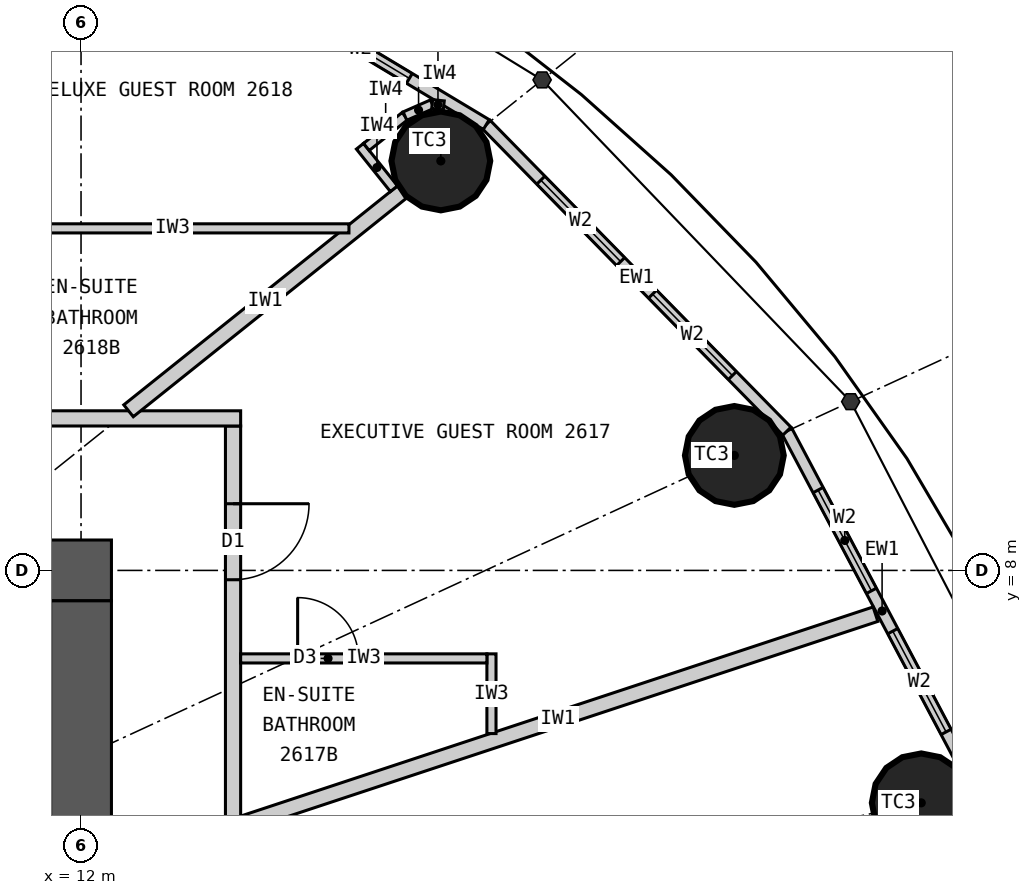
"""IFC4 building model, lengths in metres.
Left out: names, types, materials, properties, quantities, classifications, styles, units other than length and angle.
Written with IfcOpenShell. Run it as: python <this file> out.ifc"""

import sys

from ifc_helpers import new_model, si_unit, direction, frame, frame_2d, origin, origin_2d, place, context, subcontext, project, spatial, rectangle, circle, extrude, element, fill, save


model = new_model("IFC4")
c1 = context("Model", 3, precision=1e-05, world=origin(), true_north=direction((0.0, 1.0)))
c2 = subcontext(c1, "Body", "Model", "MODEL_VIEW")
j1 = project(units=[si_unit("LENGTHUNIT", "METRE"), si_unit("PLANEANGLEUNIT", "RADIAN")], contexts=[c1])
p1 = place(None, origin())
s1 = spatial("IfcSite", under=j1, at=p1, CompositionType="ELEMENT")
p2 = place(p1, origin())
s2 = spatial("IfcBuilding", under=s1, at=p2, CompositionType="ELEMENT")
p3 = place(p2, frame((0.0, 0.0, 105.6)))
s3 = spatial("IfcBuildingStorey", under=s2, at=p3, CompositionType="ELEMENT", Elevation=105.6)
for number, where, z_axis, x_axis in (
    (1, (23.055, 4.942, 0.0), (0.0, 0.0, 1.0), (1.0, 0.0, 0.0)),
    (2, (20.596, 9.513, 0.0), (0.0, 0.0, 1.0), (1.0, 0.0, 0.0)),
    (3, (16.734, 13.387, 0.0), (0.0, 0.0, 1.0), (1.0, 0.0, 0.0)),
):
    element("IfcColumn", number, at=place(p3, frame(where, z_axis=z_axis, x_axis=x_axis)), inside=s3, PredefinedType="COLUMN", context=c2, shape_type="SweptSolid", body=[
        extrude(circle(Radius=0.65, at=origin_2d()), origin(), (0.0, 0.0, 1.0), 3.3),
    ])
p4 = place(p3, frame((-12.4, 8.0, 0.0), z_axis=(0.0, 0.0, 1.0), x_axis=(1.0, 0.0, 0.0)))
e4 = element("IfcWall", 4, at=p4, inside=s3, PredefinedType="SHEAR", context=c2, shape_type="SweptSolid", body=[
    extrude(rectangle(XDim=24.8, YDim=0.8, at=frame_2d((12.4, 0.0))), origin(), (0.0, 0.0, 1.0), 3.3),
])
p5 = place(p4, frame((11.1, 0.0, 0.0)))
e5 = element("IfcOpeningElement", 5, at=p5, cuts=e4, PredefinedType="OPENING", context=c2, shape_type="SweptSolid", body=[
    extrude(rectangle(XDim=1.2, YDim=2.2, at=frame_2d((0.6, 1.1))), frame((0.0, 0.41, 0.0), z_axis=(0.0, -1.0, 0.0), x_axis=(1.0, 0.0, 0.0)), (0.0, 0.0, 1.0), 0.82),
])
p6 = place(p4, frame((18.7, 0.0, 0.0)))
e6 = element("IfcOpeningElement", 6, at=p6, cuts=e4, PredefinedType="OPENING", context=c2, shape_type="SweptSolid", body=[
    extrude(rectangle(XDim=0.9, YDim=2.2, at=frame_2d((0.45, 1.1))), frame((0.0, 0.41, 0.0), z_axis=(0.0, -1.0, 0.0), x_axis=(1.0, 0.0, 0.0)), (0.0, 0.0, 1.0), 0.82),
])
p7 = place(p3, frame((12.0, -7.6, 0.0), z_axis=(0.0, 0.0, 1.0), x_axis=(0.0, 1.0, 0.0)))
e7 = element("IfcWall", 7, at=p7, inside=s3, PredefinedType="SHEAR", context=c2, shape_type="SweptSolid", body=[
    extrude(rectangle(XDim=15.2, YDim=0.8, at=frame_2d((7.6, 0.0))), origin(), (0.0, 0.0, 1.0), 3.3),
])
p8 = place(p7, frame((6.7, 0.0, 0.0)))
e8 = element("IfcOpeningElement", 8, at=p8, cuts=e7, PredefinedType="OPENING", context=c2, shape_type="SweptSolid", body=[
    extrude(rectangle(XDim=1.8, YDim=2.2, at=frame_2d((0.9, 1.1))), frame((0.0, 0.41, 0.0), z_axis=(0.0, -1.0, 0.0), x_axis=(1.0, 0.0, 0.0)), (0.0, 0.0, 1.0), 0.82),
])
p9 = place(p3, frame((23.792, 5.1, 0.0), z_axis=(0.0, 0.0, 1.0), x_axis=(-0.467814388454, 0.883826735257, 0.0)))
e9 = element("IfcWall", 9, at=p9, inside=s3, PredefinedType="ELEMENTEDWALL", context=c2, shape_type="SweptSolid", body=[
    extrude(rectangle(XDim=5.354, YDim=0.15, at=frame_2d((2.677, 0.0))), origin(), (0.0, 0.0, 1.0), 3.12),
])
p10 = place(p9, frame((0.877, 0.0, 0.9)))
e10 = element("IfcOpeningElement", 10, at=p10, cuts=e9, PredefinedType="OPENING", context=c2, shape_type="SweptSolid", body=[
    extrude(rectangle(XDim=1.5, YDim=1.9, at=frame_2d((0.75, 0.95))), frame((0.0, 0.085, 0.0), z_axis=(0.0, -1.0, 0.0), x_axis=(1.0, 0.0, 0.0)), (0.0, 0.0, 1.0), 0.17),
])
p11 = place(p9, frame((2.977, 0.0, 0.9)))
e11 = element("IfcOpeningElement", 11, at=p11, cuts=e9, PredefinedType="OPENING", context=c2, shape_type="SweptSolid", body=[
    extrude(rectangle(XDim=1.5, YDim=1.9, at=frame_2d((0.75, 0.95))), frame((0.0, 0.085, 0.0), z_axis=(0.0, -1.0, 0.0), x_axis=(1.0, 0.0, 0.0)), (0.0, 0.0, 1.0), 0.17),
])
p12 = place(p3, frame((21.287, 9.832, 0.0), z_axis=(0.0, 0.0, 1.0), x_axis=(-0.700136650834, 0.714008872605, 0.0)))
e12 = element("IfcWall", 12, at=p12, inside=s3, PredefinedType="ELEMENTEDWALL", context=c2, shape_type="SweptSolid", body=[
    extrude(rectangle(XDim=5.649, YDim=0.15, at=frame_2d((2.825, 0.0))), origin(), (0.0, 0.0, 1.0), 3.12),
])
p13 = place(p12, frame((1.025, 0.0, 0.9)))
e13 = element("IfcOpeningElement", 13, at=p13, cuts=e12, PredefinedType="OPENING", context=c2, shape_type="SweptSolid", body=[
    extrude(rectangle(XDim=1.5, YDim=1.9, at=frame_2d((0.75, 0.95))), frame((0.0, 0.085, 0.0), z_axis=(0.0, -1.0, 0.0), x_axis=(1.0, 0.0, 0.0)), (0.0, 0.0, 1.0), 0.17),
])
p14 = place(p12, frame((3.125, 0.0, 0.9)))
e14 = element("IfcOpeningElement", 14, at=p14, cuts=e12, PredefinedType="OPENING", context=c2, shape_type="SweptSolid", body=[
    extrude(rectangle(XDim=1.5, YDim=1.9, at=frame_2d((0.75, 0.95))), frame((0.0, 0.085, 0.0), z_axis=(0.0, -1.0, 0.0), x_axis=(1.0, 0.0, 0.0)), (0.0, 0.0, 1.0), 0.17),
])
p15 = place(p3, frame((17.332, 13.866, 0.0), z_axis=(0.0, 0.0, 1.0), x_axis=(-0.857308573723, 0.514802884044, 0.0)))
e15 = element("IfcWall", 15, at=p15, inside=s3, PredefinedType="ELEMENTEDWALL", context=c2, shape_type="SweptSolid", body=[
    extrude(rectangle(XDim=5.961, YDim=0.15, at=frame_2d((2.98, 0.0))), origin(), (0.0, 0.0, 1.0), 3.12),
])
p16 = place(p15, frame((1.181, 0.0, 0.9)))
e16 = element("IfcOpeningElement", 16, at=p16, cuts=e15, PredefinedType="OPENING", context=c2, shape_type="SweptSolid", body=[
    extrude(rectangle(XDim=1.5, YDim=1.9, at=frame_2d((0.75, 0.95))), frame((0.0, 0.085, 0.0), z_axis=(0.0, -1.0, 0.0), x_axis=(1.0, 0.0, 0.0)), (0.0, 0.0, 1.0), 0.17),
])
p17 = place(p15, frame((3.281, 0.0, 0.9)))
e17 = element("IfcOpeningElement", 17, at=p17, cuts=e15, PredefinedType="OPENING", context=c2, shape_type="SweptSolid", body=[
    extrude(rectangle(XDim=1.5, YDim=1.9, at=frame_2d((0.75, 0.95))), frame((0.0, 0.085, 0.0), z_axis=(0.0, -1.0, 0.0), x_axis=(1.0, 0.0, 0.0)), (0.0, 0.0, 1.0), 0.17),
])
p18 = place(p3, frame((14.0, -9.9, 0.0), z_axis=(0.0, 0.0, 1.0), x_axis=(0.0, 1.0, 0.0)))
e18 = element("IfcWall", 18, at=p18, inside=s3, PredefinedType="PARTITIONING", context=c2, shape_type="SweptSolid", body=[
    extrude(rectangle(XDim=19.8, YDim=0.2, at=frame_2d((9.9, 0.0))), origin(), (0.0, 0.0, 1.0), 3.12),
])
p19 = place(p18, frame((3.62, 0.0, 0.0)))
e19 = element("IfcOpeningElement", 19, at=p19, cuts=e18, PredefinedType="OPENING", context=c2, shape_type="SweptSolid", body=[
    extrude(rectangle(XDim=1.6, YDim=2.4, at=frame_2d((0.8, 1.2))), frame((0.0, 0.11, 0.0), z_axis=(0.0, -1.0, 0.0), x_axis=(1.0, 0.0, 0.0)), (0.0, 0.0, 1.0), 0.22),
])
p20 = place(p18, frame((12.26, 0.0, 0.0)))
e20 = element("IfcOpeningElement", 20, at=p20, cuts=e18, PredefinedType="OPENING", context=c2, shape_type="SweptSolid", body=[
    extrude(rectangle(XDim=1.0, YDim=2.2, at=frame_2d((0.5, 1.1))), frame((0.0, 0.11, 0.0), z_axis=(0.0, -1.0, 0.0), x_axis=(1.0, 0.0, 0.0)), (0.0, 0.0, 1.0), 0.22),
])
p21 = place(p18, frame((17.777, 0.0, 0.0)))
e21 = element("IfcOpeningElement", 21, at=p21, cuts=e18, PredefinedType="OPENING", context=c2, shape_type="SweptSolid", body=[
    extrude(rectangle(XDim=1.0, YDim=2.2, at=frame_2d((0.5, 1.1))), frame((0.0, 0.11, 0.0), z_axis=(0.0, -1.0, 0.0), x_axis=(1.0, 0.0, 0.0)), (0.0, 0.0, 1.0), 0.22),
])
p22 = place(p3, frame((3.283, 10.0, 0.0), z_axis=(0.0, 0.0, 1.0), x_axis=(1.0, 0.0, 0.0)))
e22 = element("IfcWall", 22, at=p22, inside=s3, PredefinedType="PARTITIONING", context=c2, shape_type="SweptSolid", body=[
    extrude(rectangle(XDim=10.817, YDim=0.2, at=frame_2d((5.409, 0.0))), origin(), (0.0, 0.0, 1.0), 3.12),
])
p23 = place(p22, frame((6.482, 0.0, 0.0)))
e23 = element("IfcOpeningElement", 23, at=p23, cuts=e22, PredefinedType="OPENING", context=c2, shape_type="SweptSolid", body=[
    extrude(rectangle(XDim=1.0, YDim=2.2, at=frame_2d((0.5, 1.1))), frame((0.0, 0.11, 0.0), z_axis=(0.0, -1.0, 0.0), x_axis=(1.0, 0.0, 0.0)), (0.0, 0.0, 1.0), 0.22),
])
p24 = place(p3, frame((14.1, 4.662, 0.0), z_axis=(0.0, 0.0, 1.0), x_axis=(0.949446466373, 0.313928984789, 0.0)))
e24 = element("IfcWall", 24, at=p24, inside=s3, PredefinedType="PARTITIONING", context=c2, shape_type="SweptSolid", body=[
    extrude(rectangle(XDim=8.797, YDim=0.2, at=frame_2d((4.399, 0.0))), origin(), (0.0, 0.0, 1.0), 3.12),
])
p25 = place(p3, frame((12.625, 10.1, 0.0), z_axis=(0.0, 0.0, 1.0), x_axis=(0.780863644897, 0.624701503182, 0.0)))
e25 = element("IfcWall", 25, at=p25, inside=s3, PredefinedType="PARTITIONING", context=c2, shape_type="SweptSolid", body=[
    extrude(rectangle(XDim=4.612, YDim=0.2, at=frame_2d((2.306, 0.0))), origin(), (0.0, 0.0, 1.0), 2.27),
])
p26 = place(p3, frame((17.4, 5.854, 0.0), z_axis=(0.0, 0.0, 1.0), x_axis=(0.0, 1.0, 0.0)))
e26 = element("IfcWall", 26, at=p26, inside=s3, PredefinedType="PARTITIONING", context=c2, shape_type="SweptSolid", body=[
    extrude(rectangle(XDim=1.049, YDim=0.12, at=frame_2d((0.524, 0.0))), origin(), (0.0, 0.0, 1.0), 3.12),
])
p27 = place(p3, frame((14.1, 6.842, 0.0), z_axis=(0.0, 0.0, 1.0), x_axis=(1.0, 0.0, 0.0)))
e27 = element("IfcWall", 27, at=p27, inside=s3, PredefinedType="PARTITIONING", context=c2, shape_type="SweptSolid", body=[
    extrude(rectangle(XDim=3.24, YDim=0.12, at=frame_2d((1.62, 0.0))), origin(), (0.0, 0.0, 1.0), 3.12),
])
p28 = place(p27, frame((0.75, 0.0, 0.0)))
e28 = element("IfcOpeningElement", 28, at=p28, cuts=e27, PredefinedType="OPENING", context=c2, shape_type="SweptSolid", body=[
    extrude(rectangle(XDim=0.8, YDim=2.1, at=frame_2d((0.4, 1.05))), frame((0.0, 0.07, 0.0), z_axis=(0.0, -1.0, 0.0), x_axis=(1.0, 0.0, 0.0)), (0.0, 0.0, 1.0), 0.14),
])
p29 = place(p3, frame((15.525, 12.5, 0.0), z_axis=(0.0, 0.0, 1.0), x_axis=(-1.0, 0.0, 0.0)))
e29 = element("IfcWall", 29, at=p29, inside=s3, PredefinedType="PARTITIONING", context=c2, shape_type="SweptSolid", body=[
    extrude(rectangle(XDim=4.64, YDim=0.12, at=frame_2d((2.32, 0.0))), origin(), (0.0, 0.0, 1.0), 3.12),
])
p30 = place(p3, frame((16.117, 13.022, 0.0), z_axis=(0.0, 0.0, 1.0), x_axis=(-0.62465344249, 0.780902091677, 0.0)))
e30 = element("IfcWall", 30, at=p30, inside=s3, PredefinedType="PARTITIONING", context=c2, shape_type="SweptSolid", body=[
    extrude(rectangle(XDim=0.716, YDim=0.12, at=frame_2d((0.358, 0.0))), origin(), (0.0, 0.0, 1.0), 3.12),
])
p31 = place(p3, frame((15.754, 13.571, 0.0), z_axis=(0.0, 0.0, 1.0), x_axis=(0.780905453553, 0.624649239663, 0.0)))
e31 = element("IfcWall", 31, at=p31, inside=s3, PredefinedType="PARTITIONING", context=c2, shape_type="SweptSolid", body=[
    extrude(rectangle(XDim=0.65, YDim=0.12, at=frame_2d((0.325, 0.0))), origin(), (0.0, 0.0, 1.0), 3.12),
])
p32 = place(p3, frame((16.262, 13.977, 0.0), z_axis=(0.0, 0.0, 1.0), x_axis=(0.915985403703, 0.401211590314, 0.0)))
e32 = element("IfcWall", 32, at=p32, inside=s3, PredefinedType="PARTITIONING", context=c2, shape_type="SweptSolid", body=[
    extrude(rectangle(XDim=0.391, YDim=0.12, at=frame_2d((0.196, 0.0))), origin(), (0.0, 0.0, 1.0), 3.12),
])
p33 = place(p3, frame((16.62, 14.134, 0.0), z_axis=(0.0, 0.0, 1.0), x_axis=(0.993941871493, -0.109907033867, 0.0)))
e33 = element("IfcWall", 33, at=p33, inside=s3, PredefinedType="PARTITIONING", context=c2, shape_type="SweptSolid", body=[
    extrude(rectangle(XDim=0.153, YDim=0.12, at=frame_2d((0.077, 0.0))), origin(), (0.0, 0.0, 1.0), 3.12),
])
p34 = place(p10, origin())
e34 = element("IfcWindow", 34, at=p34, inside=s3, PartitioningType="SINGLE_PANEL", PredefinedType="WINDOW", context=c2, shape_type="SweptSolid", body=[
    extrude(rectangle(XDim=1.5, YDim=1.9, at=frame_2d((0.75, 0.95))), frame((0.0, 0.03, 0.0), z_axis=(0.0, -1.0, 0.0), x_axis=(1.0, 0.0, 0.0)), (0.0, 0.0, 1.0), 0.06),
])
fill(e10, e34)
p35 = place(p11, origin())
e35 = element("IfcWindow", 35, at=p35, inside=s3, PartitioningType="SINGLE_PANEL", PredefinedType="WINDOW", context=c2, shape_type="SweptSolid", body=[
    extrude(rectangle(XDim=1.5, YDim=1.9, at=frame_2d((0.75, 0.95))), frame((0.0, 0.03, 0.0), z_axis=(0.0, -1.0, 0.0), x_axis=(1.0, 0.0, 0.0)), (0.0, 0.0, 1.0), 0.06),
])
fill(e11, e35)
p36 = place(p13, origin())
e36 = element("IfcWindow", 36, at=p36, inside=s3, PartitioningType="SINGLE_PANEL", PredefinedType="WINDOW", context=c2, shape_type="SweptSolid", body=[
    extrude(rectangle(XDim=1.5, YDim=1.9, at=frame_2d((0.75, 0.95))), frame((0.0, 0.03, 0.0), z_axis=(0.0, -1.0, 0.0), x_axis=(1.0, 0.0, 0.0)), (0.0, 0.0, 1.0), 0.06),
])
fill(e13, e36)
p37 = place(p14, origin())
e37 = element("IfcWindow", 37, at=p37, inside=s3, PartitioningType="SINGLE_PANEL", PredefinedType="WINDOW", context=c2, shape_type="SweptSolid", body=[
    extrude(rectangle(XDim=1.5, YDim=1.9, at=frame_2d((0.75, 0.95))), frame((0.0, 0.03, 0.0), z_axis=(0.0, -1.0, 0.0), x_axis=(1.0, 0.0, 0.0)), (0.0, 0.0, 1.0), 0.06),
])
fill(e14, e37)
p38 = place(p16, origin())
e38 = element("IfcWindow", 38, at=p38, inside=s3, PartitioningType="SINGLE_PANEL", PredefinedType="WINDOW", context=c2, shape_type="SweptSolid", body=[
    extrude(rectangle(XDim=1.5, YDim=1.9, at=frame_2d((0.75, 0.95))), frame((0.0, 0.03, 0.0), z_axis=(0.0, -1.0, 0.0), x_axis=(1.0, 0.0, 0.0)), (0.0, 0.0, 1.0), 0.06),
])
fill(e16, e38)
p39 = place(p28, origin())
e39 = element("IfcDoor", 39, at=p39, inside=s3, OperationType="SINGLE_SWING_LEFT", PredefinedType="DOOR", context=c2, shape_type="SweptSolid", body=[
    extrude(rectangle(XDim=0.8, YDim=2.1, at=frame_2d((0.4, 1.05))), frame((0.0, 0.025, 0.0), z_axis=(0.0, -1.0, 0.0), x_axis=(1.0, 0.0, 0.0)), (0.0, 0.0, 1.0), 0.05),
])
fill(e28, e39)
p40 = place(p21, origin())
e40 = element("IfcDoor", 40, at=p40, inside=s3, OperationType="SINGLE_SWING_RIGHT", PredefinedType="DOOR", context=c2, shape_type="SweptSolid", body=[
    extrude(rectangle(XDim=1.0, YDim=2.2, at=frame_2d((0.5, 1.1))), frame((0.0, 0.025, 0.0), z_axis=(0.0, -1.0, 0.0), x_axis=(1.0, 0.0, 0.0)), (0.0, 0.0, 1.0), 0.05),
])
fill(e21, e40)
save(model, sys.argv[1])
